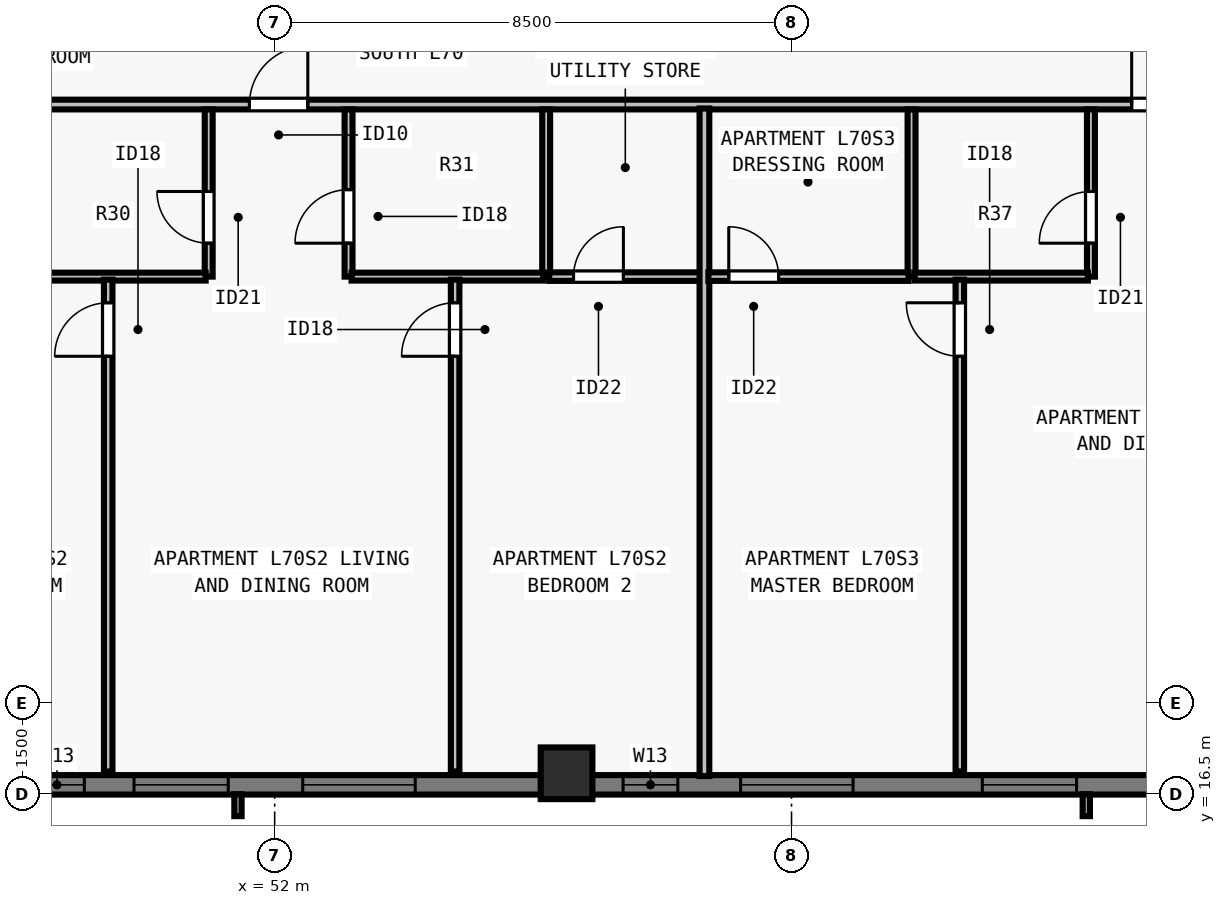
"""IFC4 building model, lengths in metres.
Left out: names, types, materials, properties, quantities, classifications, styles, units other than length and angle.
Written with IfcOpenShell. Run it as: python <this file> out.ifc"""

import sys

from ifc_helpers import new_model, si_unit, direction, frame, frame_2d, origin, origin_2d, place, context, subcontext, project, spatial, rectangle, extrude, element, fill, save


model = new_model("IFC4")
c1 = context("Model", 3, precision=1e-05, world=origin(), true_north=direction((0.0, 1.0)))
c2 = subcontext(c1, "Body", "Model", "MODEL_VIEW")
j1 = project(units=[si_unit("LENGTHUNIT", "METRE"), si_unit("PLANEANGLEUNIT", "RADIAN")], contexts=[c1])
p1 = place(None, origin())
s1 = spatial("IfcSite", under=j1, at=p1, CompositionType="ELEMENT")
p2 = place(p1, origin())
s2 = spatial("IfcBuilding", under=s1, at=p2, CompositionType="ELEMENT")
p3 = place(p2, frame((0.0, 0.0, 255.0)))
s3 = spatial("IfcBuildingStorey", under=s2, at=p3, CompositionType="ELEMENT", Elevation=255.0)
p4 = place(p3, frame((56.8, 16.85, 0.0), z_axis=(0.0, 0.0, 1.0), x_axis=(1.0, 0.0, 0.0)))
e1 = element("IfcColumn", 1, at=p4, inside=s3, PredefinedType="COLUMN", context=c2, shape_type="SweptSolid", body=[
    extrude(rectangle(XDim=0.85, YDim=0.85, at=origin_2d()), origin(), (0.0, 0.0, 1.0), 3.5),
])
p5 = place(p3, frame((69.5, 16.66, 0.0), z_axis=(0.0, 0.0, 1.0), x_axis=(-1.0, 0.0, 0.0)))
e2 = element("IfcWall", 2, at=p5, inside=s3, PredefinedType="SOLIDWALL", context=c2, shape_type="SweptSolid", body=[
    extrude(rectangle(XDim=34.702, YDim=0.32, at=frame_2d((17.351, 0.0))), origin(), (0.0, 0.0, 1.0), 3.29),
])
p6 = place(p5, frame((4.312, 0.0, 0.8)))
e3 = element("IfcOpeningElement", 3, at=p6, cuts=e2, PredefinedType="OPENING", context=c2, shape_type="SweptSolid", body=[
    extrude(rectangle(XDim=1.55, YDim=1.678, at=frame_2d((0.775, 0.839))), frame((0.0, 0.17, 0.0), z_axis=(0.0, -1.0, 0.0), x_axis=(1.0, 0.0, 0.0)), (0.0, 0.0, 1.0), 0.34),
])
p7 = place(p5, frame((7.988, 0.0, 0.8)))
e4 = element("IfcOpeningElement", 4, at=p7, cuts=e2, PredefinedType="OPENING", context=c2, shape_type="SweptSolid", body=[
    extrude(rectangle(XDim=1.85, YDim=1.678, at=frame_2d((0.925, 0.839))), frame((0.0, 0.17, 0.0), z_axis=(0.0, -1.0, 0.0), x_axis=(1.0, 0.0, 0.0)), (0.0, 0.0, 1.0), 0.34),
])
p8 = place(p5, frame((15.188, 0.0, 0.8)))
e5 = element("IfcOpeningElement", 5, at=p8, cuts=e2, PredefinedType="OPENING", context=c2, shape_type="SweptSolid", body=[
    extrude(rectangle(XDim=1.85, YDim=1.678, at=frame_2d((0.925, 0.839))), frame((0.0, 0.17, 0.0), z_axis=(0.0, -1.0, 0.0), x_axis=(1.0, 0.0, 0.0)), (0.0, 0.0, 1.0), 0.34),
])
p9 = place(p5, frame((18.264, 0.0, 0.8)))
e6 = element("IfcOpeningElement", 6, at=p9, cuts=e2, PredefinedType="OPENING", context=c2, shape_type="SweptSolid", body=[
    extrude(rectangle(XDim=1.55, YDim=1.678, at=frame_2d((0.775, 0.839))), frame((0.0, 0.17, 0.0), z_axis=(0.0, -1.0, 0.0), x_axis=(1.0, 0.0, 0.0)), (0.0, 0.0, 1.0), 0.34),
])
p10 = place(p5, frame((25.014, 0.0, 0.8)))
e7 = element("IfcOpeningElement", 7, at=p10, cuts=e2, PredefinedType="OPENING", context=c2, shape_type="SweptSolid", body=[
    extrude(rectangle(XDim=1.55, YDim=1.678, at=frame_2d((0.775, 0.839))), frame((0.0, 0.17, 0.0), z_axis=(0.0, -1.0, 0.0), x_axis=(1.0, 0.0, 0.0)), (0.0, 0.0, 1.0), 0.34),
])
p11 = place(p5, frame((20.63, 0.0, 0.8)))
e8 = element("IfcOpeningElement", 8, at=p11, cuts=e2, PredefinedType="OPENING", context=c2, shape_type="SweptSolid", body=[
    extrude(rectangle(XDim=0.9, YDim=1.678, at=frame_2d((0.45, 0.839))), frame((0.0, 0.17, 0.0), z_axis=(0.0, -1.0, 0.0), x_axis=(1.0, 0.0, 0.0)), (0.0, 0.0, 1.0), 0.34),
])
p12 = place(p5, frame((10.87, 0.0, 0.8)))
e9 = element("IfcOpeningElement", 9, at=p12, cuts=e2, PredefinedType="OPENING", context=c2, shape_type="SweptSolid", body=[
    extrude(rectangle(XDim=0.9, YDim=1.678, at=frame_2d((0.45, 0.839))), frame((0.0, 0.17, 0.0), z_axis=(0.0, -1.0, 0.0), x_axis=(1.0, 0.0, 0.0)), (0.0, 0.0, 1.0), 0.34),
])
p13 = place(p3, frame((32.06, 27.847, 0.0), z_axis=(0.0, 0.0, 1.0), x_axis=(1.0, 0.0, 0.0)))
e10 = element("IfcWall", 10, at=p13, inside=s3, PredefinedType="PARTITIONING", context=c2, shape_type="SweptSolid", body=[
    extrude(rectangle(XDim=42.135, YDim=0.16, at=frame_2d((21.067, 0.0))), origin(), (0.0, 0.0, 1.0), 2.958),
])
p14 = place(p13, frame((4.951, 0.0, 0.0)))
e11 = element("IfcOpeningElement", 11, at=p14, cuts=e10, PredefinedType="OPENING", context=c2, shape_type="SweptSolid", body=[
    extrude(rectangle(XDim=0.96, YDim=2.18, at=frame_2d((0.48, 1.09))), frame((0.0, 0.09, 0.0), z_axis=(0.0, -1.0, 0.0), x_axis=(1.0, 0.0, 0.0)), (0.0, 0.0, 1.0), 0.18),
])
p15 = place(p13, frame((19.525, 0.0, 0.0)))
e12 = element("IfcOpeningElement", 12, at=p15, cuts=e10, PredefinedType="OPENING", context=c2, shape_type="SweptSolid", body=[
    extrude(rectangle(XDim=0.96, YDim=2.18, at=frame_2d((0.48, 1.09))), frame((0.0, 0.09, 0.0), z_axis=(0.0, -1.0, 0.0), x_axis=(1.0, 0.0, 0.0)), (0.0, 0.0, 1.0), 0.18),
])
p16 = place(p13, frame((34.034, 0.0, 0.0)))
e13 = element("IfcOpeningElement", 13, at=p16, cuts=e10, PredefinedType="OPENING", context=c2, shape_type="SweptSolid", body=[
    extrude(rectangle(XDim=0.96, YDim=2.18, at=frame_2d((0.48, 1.09))), frame((0.0, 0.09, 0.0), z_axis=(0.0, -1.0, 0.0), x_axis=(1.0, 0.0, 0.0)), (0.0, 0.0, 1.0), 0.18),
])
p17 = place(p3, frame((50.915, 25.018, 0.0), z_axis=(0.0, 0.0, 1.0), x_axis=(0.0, 1.0, 0.0)))
e14 = element("IfcWall", 14, at=p17, inside=s3, PredefinedType="PLUMBINGWALL", context=c2, shape_type="SweptSolid", body=[
    extrude(rectangle(XDim=2.75, YDim=0.13, at=frame_2d((1.375, 0.0))), origin(), (0.0, 0.0, 1.0), 3.29),
])
p18 = place(p17, frame((0.55, 0.0, 0.0)))
e15 = element("IfcOpeningElement", 15, at=p18, cuts=e14, PredefinedType="OPENING", context=c2, shape_type="SweptSolid", body=[
    extrude(rectangle(XDim=0.85, YDim=2.08, at=frame_2d((0.425, 1.04))), frame((0.0, 0.075, 0.0), z_axis=(0.0, -1.0, 0.0), x_axis=(1.0, 0.0, 0.0)), (0.0, 0.0, 1.0), 0.15),
])
p19 = place(p3, frame((48.015, 25.018, 0.0), z_axis=(0.0, 0.0, 1.0), x_axis=(1.0, 0.0, 0.0)))
e16 = element("IfcWall", 16, at=p19, inside=s3, PredefinedType="PLUMBINGWALL", context=c2, shape_type="SweptSolid", body=[
    extrude(rectangle(XDim=2.85, YDim=0.13, at=frame_2d((1.425, 0.0))), origin(), (0.0, 0.0, 1.0), 3.29),
])
p20 = place(p3, frame((56.465, 25.018, 0.0), z_axis=(0.0, 0.0, 1.0), x_axis=(0.0, 1.0, 0.0)))
e17 = element("IfcWall", 17, at=p20, inside=s3, PredefinedType="PLUMBINGWALL", context=c2, shape_type="SweptSolid", body=[
    extrude(rectangle(XDim=2.75, YDim=0.13, at=frame_2d((1.375, 0.0))), origin(), (0.0, 0.0, 1.0), 3.29),
])
p21 = place(p3, frame((53.215, 25.018, 0.0), z_axis=(0.0, 0.0, 1.0), x_axis=(0.0, 1.0, 0.0)))
e18 = element("IfcWall", 18, at=p21, inside=s3, PredefinedType="PLUMBINGWALL", context=c2, shape_type="SweptSolid", body=[
    extrude(rectangle(XDim=2.75, YDim=0.13, at=frame_2d((1.375, 0.0))), origin(), (0.0, 0.0, 1.0), 2.958),
])
p22 = place(p21, frame((0.55, 0.0, 0.0)))
e19 = element("IfcOpeningElement", 19, at=p22, cuts=e18, PredefinedType="OPENING", context=c2, shape_type="SweptSolid", body=[
    extrude(rectangle(XDim=0.88, YDim=2.1, at=frame_2d((0.44, 1.05))), frame((0.0, 0.075, 0.0), z_axis=(0.0, -1.0, 0.0), x_axis=(1.0, 0.0, 0.0)), (0.0, 0.0, 1.0), 0.15),
])
p23 = place(p3, frame((53.265, 25.018, 0.0), z_axis=(0.0, 0.0, 1.0), x_axis=(1.0, 0.0, 0.0)))
e20 = element("IfcWall", 20, at=p23, inside=s3, PredefinedType="PLUMBINGWALL", context=c2, shape_type="SweptSolid", body=[
    extrude(rectangle(XDim=3.15, YDim=0.13, at=frame_2d((1.575, 0.0))), origin(), (0.0, 0.0, 1.0), 3.29),
])
p24 = place(p3, frame((49.262, 16.88, 0.0), z_axis=(0.0, 0.0, 1.0), x_axis=(0.0, 1.0, 0.0)))
e21 = element("IfcWall", 21, at=p24, inside=s3, PredefinedType="PARTITIONING", context=c2, shape_type="SweptSolid", body=[
    extrude(rectangle(XDim=8.088, YDim=0.14, at=frame_2d((4.044, 0.0))), origin(), (0.0, 0.0, 1.0), 2.958),
])
p25 = place(p24, frame((6.827, 0.0, 0.0)))
e22 = element("IfcOpeningElement", 22, at=p25, cuts=e21, PredefinedType="OPENING", context=c2, shape_type="SweptSolid", body=[
    extrude(rectangle(XDim=0.88, YDim=2.1, at=frame_2d((0.44, 1.05))), frame((0.0, 0.08, 0.0), z_axis=(0.0, -1.0, 0.0), x_axis=(1.0, 0.0, 0.0)), (0.0, 0.0, 1.0), 0.16),
])
p26 = place(p3, frame((54.968, 16.88, 0.0), z_axis=(0.0, 0.0, 1.0), x_axis=(0.0, 1.0, 0.0)))
e23 = element("IfcWall", 23, at=p26, inside=s3, PredefinedType="PARTITIONING", context=c2, shape_type="SweptSolid", body=[
    extrude(rectangle(XDim=8.088, YDim=0.14, at=frame_2d((4.044, 0.0))), origin(), (0.0, 0.0, 1.0), 3.29),
])
p27 = place(p26, frame((6.827, 0.0, 0.0)))
e24 = element("IfcOpeningElement", 24, at=p27, cuts=e23, PredefinedType="OPENING", context=c2, shape_type="SweptSolid", body=[
    extrude(rectangle(XDim=0.88, YDim=2.1, at=frame_2d((0.44, 1.05))), frame((0.0, 0.08, 0.0), z_axis=(0.0, -1.0, 0.0), x_axis=(1.0, 0.0, 0.0)), (0.0, 0.0, 1.0), 0.16),
])
p28 = place(p3, frame((56.515, 25.018, 0.0), z_axis=(0.0, 0.0, 1.0), x_axis=(1.0, 0.0, 0.0)))
e25 = element("IfcWall", 25, at=p28, inside=s3, PredefinedType="PARTITIONING", context=c2, shape_type="SweptSolid", body=[
    extrude(rectangle(XDim=2.603, YDim=0.14, at=frame_2d((1.301, 0.0))), origin(), (0.0, 0.0, 1.0), 3.29),
])
p29 = place(p28, frame((0.4, 0.0, 0.0)))
e26 = element("IfcOpeningElement", 26, at=p29, cuts=e25, PredefinedType="OPENING", context=c2, shape_type="SweptSolid", body=[
    extrude(rectangle(XDim=0.82, YDim=2.1, at=frame_2d((0.41, 1.05))), frame((0.0, 0.08, 0.0), z_axis=(0.0, -1.0, 0.0), x_axis=(1.0, 0.0, 0.0)), (0.0, 0.0, 1.0), 0.16),
])
p30 = place(p3, frame((59.067, 16.805, 0.0), z_axis=(0.0, 0.0, 1.0), x_axis=(0.0, 1.0, 0.0)))
e27 = element("IfcWall", 27, at=p30, inside=s3, PredefinedType="PARTITIONING", context=c2, shape_type="SweptSolid", body=[
    extrude(rectangle(XDim=10.978, YDim=0.16, at=frame_2d((5.489, 0.0))), origin(), (0.0, 0.0, 1.0), 3.29),
])
p31 = place(p3, frame((62.474, 25.018, 0.0), z_axis=(0.0, 0.0, 1.0), x_axis=(0.0, 1.0, 0.0)))
e28 = element("IfcWall", 28, at=p31, inside=s3, PredefinedType="PLUMBINGWALL", context=c2, shape_type="SweptSolid", body=[
    extrude(rectangle(XDim=2.75, YDim=0.13, at=frame_2d((1.375, 0.0))), origin(), (0.0, 0.0, 1.0), 2.573),
])
p32 = place(p3, frame((65.424, 25.018, 0.0), z_axis=(0.0, 0.0, 1.0), x_axis=(0.0, 1.0, 0.0)))
e29 = element("IfcWall", 29, at=p32, inside=s3, PredefinedType="PLUMBINGWALL", context=c2, shape_type="SweptSolid", body=[
    extrude(rectangle(XDim=2.75, YDim=0.13, at=frame_2d((1.375, 0.0))), origin(), (0.0, 0.0, 1.0), 3.29),
])
p33 = place(p32, frame((0.55, 0.0, 0.0)))
e30 = element("IfcOpeningElement", 30, at=p33, cuts=e29, PredefinedType="OPENING", context=c2, shape_type="SweptSolid", body=[
    extrude(rectangle(XDim=0.85, YDim=2.08, at=frame_2d((0.425, 1.04))), frame((0.0, 0.075, 0.0), z_axis=(0.0, -1.0, 0.0), x_axis=(1.0, 0.0, 0.0)), (0.0, 0.0, 1.0), 0.15),
])
p34 = place(p3, frame((62.524, 25.018, 0.0), z_axis=(0.0, 0.0, 1.0), x_axis=(1.0, 0.0, 0.0)))
e31 = element("IfcWall", 31, at=p34, inside=s3, PredefinedType="PLUMBINGWALL", context=c2, shape_type="SweptSolid", body=[
    extrude(rectangle(XDim=2.85, YDim=0.13, at=frame_2d((1.425, 0.0))), origin(), (0.0, 0.0, 1.0), 3.29),
])
p35 = place(p3, frame((63.268, 16.88, 0.0), z_axis=(0.0, 0.0, 1.0), x_axis=(0.0, 1.0, 0.0)))
e32 = element("IfcWall", 32, at=p35, inside=s3, PredefinedType="PARTITIONING", context=c2, shape_type="SweptSolid", body=[
    extrude(rectangle(XDim=8.088, YDim=0.14, at=frame_2d((4.044, 0.0))), origin(), (0.0, 0.0, 1.0), 3.29),
])
p36 = place(p35, frame((6.827, 0.0, 0.0)))
e33 = element("IfcOpeningElement", 33, at=p36, cuts=e32, PredefinedType="OPENING", context=c2, shape_type="SweptSolid", body=[
    extrude(rectangle(XDim=0.88, YDim=2.1, at=frame_2d((0.44, 1.05))), frame((0.0, 0.08, 0.0), z_axis=(0.0, -1.0, 0.0), x_axis=(1.0, 0.0, 0.0)), (0.0, 0.0, 1.0), 0.16),
])
p37 = place(p3, frame((59.133, 25.018, 0.0), z_axis=(0.0, 0.0, 1.0), x_axis=(1.0, 0.0, 0.0)))
e34 = element("IfcWall", 34, at=p37, inside=s3, PredefinedType="PARTITIONING", context=c2, shape_type="SweptSolid", body=[
    extrude(rectangle(XDim=3.291, YDim=0.14, at=frame_2d((1.646, 0.0))), origin(), (0.0, 0.0, 1.0), 3.29),
])
p38 = place(p37, frame((0.335, 0.0, 0.0)))
e35 = element("IfcOpeningElement", 35, at=p38, cuts=e34, PredefinedType="OPENING", context=c2, shape_type="SweptSolid", body=[
    extrude(rectangle(XDim=0.82, YDim=2.1, at=frame_2d((0.41, 1.05))), frame((0.0, 0.08, 0.0), z_axis=(0.0, -1.0, 0.0), x_axis=(1.0, 0.0, 0.0)), (0.0, 0.0, 1.0), 0.16),
])
p39 = place(p6, origin())
e36 = element("IfcWindow", 36, at=p39, inside=s3, PartitioningType="SINGLE_PANEL", PredefinedType="WINDOW", context=c2, shape_type="SweptSolid", body=[
    extrude(rectangle(XDim=1.55, YDim=1.678, at=frame_2d((0.775, 0.839))), frame((0.0, -0.05, 0.0), z_axis=(0.0, -1.0, 0.0), x_axis=(1.0, 0.0, 0.0)), (0.0, 0.0, 1.0), 0.06),
])
fill(e3, e36)
p40 = place(p7, origin())
e37 = element("IfcWindow", 37, at=p40, inside=s3, PartitioningType="SINGLE_PANEL", PredefinedType="WINDOW", context=c2, shape_type="SweptSolid", body=[
    extrude(rectangle(XDim=1.85, YDim=1.678, at=frame_2d((0.925, 0.839))), frame((0.0, -0.05, 0.0), z_axis=(0.0, -1.0, 0.0), x_axis=(1.0, 0.0, 0.0)), (0.0, 0.0, 1.0), 0.06),
])
fill(e4, e37)
p41 = place(p8, origin())
e38 = element("IfcWindow", 38, at=p41, inside=s3, PartitioningType="SINGLE_PANEL", PredefinedType="WINDOW", context=c2, shape_type="SweptSolid", body=[
    extrude(rectangle(XDim=1.85, YDim=1.678, at=frame_2d((0.925, 0.839))), frame((0.0, -0.05, 0.0), z_axis=(0.0, -1.0, 0.0), x_axis=(1.0, 0.0, 0.0)), (0.0, 0.0, 1.0), 0.06),
])
fill(e5, e38)
p42 = place(p9, origin())
e39 = element("IfcWindow", 39, at=p42, inside=s3, PartitioningType="SINGLE_PANEL", PredefinedType="WINDOW", context=c2, shape_type="SweptSolid", body=[
    extrude(rectangle(XDim=1.55, YDim=1.678, at=frame_2d((0.775, 0.839))), frame((0.0, -0.05, 0.0), z_axis=(0.0, -1.0, 0.0), x_axis=(1.0, 0.0, 0.0)), (0.0, 0.0, 1.0), 0.06),
])
fill(e6, e39)
p43 = place(p11, origin())
e40 = element("IfcWindow", 40, at=p43, inside=s3, PartitioningType="SINGLE_PANEL", PredefinedType="WINDOW", context=c2, shape_type="SweptSolid", body=[
    extrude(rectangle(XDim=0.9, YDim=1.678, at=frame_2d((0.45, 0.839))), frame((0.0, -0.04, 0.0), z_axis=(0.0, -1.0, 0.0), x_axis=(1.0, 0.0, 0.0)), (0.0, 0.0, 1.0), 0.06),
])
fill(e8, e40)
p44 = place(p12, origin())
e41 = element("IfcWindow", 41, at=p44, inside=s3, PartitioningType="SINGLE_PANEL", PredefinedType="WINDOW", context=c2, shape_type="SweptSolid", body=[
    extrude(rectangle(XDim=0.9, YDim=1.678, at=frame_2d((0.45, 0.839))), frame((0.0, -0.04, 0.0), z_axis=(0.0, -1.0, 0.0), x_axis=(1.0, 0.0, 0.0)), (0.0, 0.0, 1.0), 0.06),
])
fill(e9, e41)
p45 = place(p18, origin())
e42 = element("IfcDoor", 42, at=p45, inside=s3, OperationType="SINGLE_SWING_RIGHT", PredefinedType="DOOR", context=c2, shape_type="SweptSolid", body=[
    extrude(rectangle(XDim=0.85, YDim=2.08, at=frame_2d((0.425, 1.04))), frame((0.0, 0.025, 0.0), z_axis=(0.0, -1.0, 0.0), x_axis=(1.0, 0.0, 0.0)), (0.0, 0.0, 1.0), 0.05),
])
fill(e15, e42)
p46 = place(p22, origin())
e43 = element("IfcDoor", 43, at=p46, inside=s3, OperationType="SINGLE_SWING_LEFT", PredefinedType="DOOR", context=c2, shape_type="SweptSolid", body=[
    extrude(rectangle(XDim=0.88, YDim=2.1, at=frame_2d((0.44, 1.05))), frame((0.0, 0.025, 0.0), z_axis=(0.0, -1.0, 0.0), x_axis=(1.0, 0.0, 0.0)), (0.0, 0.0, 1.0), 0.05),
])
fill(e19, e43)
p47 = place(p25, origin())
e44 = element("IfcDoor", 44, at=p47, inside=s3, OperationType="SINGLE_SWING_LEFT", PredefinedType="DOOR", context=c2, shape_type="SweptSolid", body=[
    extrude(rectangle(XDim=0.88, YDim=2.1, at=frame_2d((0.44, 1.05))), frame((0.0, 0.025, 0.0), z_axis=(0.0, -1.0, 0.0), x_axis=(1.0, 0.0, 0.0)), (0.0, 0.0, 1.0), 0.05),
])
fill(e22, e44)
p48 = place(p29, origin())
e45 = element("IfcDoor", 45, at=p48, inside=s3, OperationType="SINGLE_SWING_RIGHT", PredefinedType="DOOR", context=c2, shape_type="SweptSolid", body=[
    extrude(rectangle(XDim=0.82, YDim=2.1, at=frame_2d((0.41, 1.05))), frame((0.0, 0.025, 0.0), z_axis=(0.0, -1.0, 0.0), x_axis=(1.0, 0.0, 0.0)), (0.0, 0.0, 1.0), 0.05),
])
fill(e26, e45)
p49 = place(p27, origin())
e46 = element("IfcDoor", 46, at=p49, inside=s3, OperationType="SINGLE_SWING_LEFT", PredefinedType="DOOR", context=c2, shape_type="SweptSolid", body=[
    extrude(rectangle(XDim=0.88, YDim=2.1, at=frame_2d((0.44, 1.05))), frame((0.0, 0.025, 0.0), z_axis=(0.0, -1.0, 0.0), x_axis=(1.0, 0.0, 0.0)), (0.0, 0.0, 1.0), 0.05),
])
fill(e24, e46)
p50 = place(p15, origin())
e47 = element("IfcDoor", 47, at=p50, inside=s3, OperationType="SINGLE_SWING_RIGHT", PredefinedType="DOOR", context=c2, shape_type="SweptSolid", body=[
    extrude(rectangle(XDim=0.96, YDim=2.18, at=frame_2d((0.48, 1.09))), frame((0.0, 0.025, 0.0), z_axis=(0.0, -1.0, 0.0), x_axis=(1.0, 0.0, 0.0)), (0.0, 0.0, 1.0), 0.05),
])
fill(e12, e47)
p51 = place(p33, origin())
e48 = element("IfcDoor", 48, at=p51, inside=s3, OperationType="SINGLE_SWING_LEFT", PredefinedType="DOOR", context=c2, shape_type="SweptSolid", body=[
    extrude(rectangle(XDim=0.85, YDim=2.08, at=frame_2d((0.425, 1.04))), frame((0.0, 0.025, 0.0), z_axis=(0.0, -1.0, 0.0), x_axis=(1.0, 0.0, 0.0)), (0.0, 0.0, 1.0), 0.05),
])
fill(e30, e48)
p52 = place(p38, origin())
e49 = element("IfcDoor", 49, at=p52, inside=s3, OperationType="SINGLE_SWING_LEFT", PredefinedType="DOOR", context=c2, shape_type="SweptSolid", body=[
    extrude(rectangle(XDim=0.82, YDim=2.1, at=frame_2d((0.41, 1.05))), frame((0.0, 0.025, 0.0), z_axis=(0.0, -1.0, 0.0), x_axis=(1.0, 0.0, 0.0)), (0.0, 0.0, 1.0), 0.05),
])
fill(e35, e49)
p53 = place(p36, origin())
e50 = element("IfcDoor", 50, at=p53, inside=s3, OperationType="SINGLE_SWING_RIGHT", PredefinedType="DOOR", context=c2, shape_type="SweptSolid", body=[
    extrude(rectangle(XDim=0.88, YDim=2.1, at=frame_2d((0.44, 1.05))), frame((0.0, 0.025, 0.0), z_axis=(0.0, -1.0, 0.0), x_axis=(1.0, 0.0, 0.0)), (0.0, 0.0, 1.0), 0.05),
])
fill(e33, e50)
p54 = place(p16, origin())
e51 = element("IfcDoor", 51, at=p54, inside=s3, OperationType="SINGLE_SWING_LEFT", PredefinedType="DOOR", context=c2, shape_type="SweptSolid", body=[
    extrude(rectangle(XDim=0.96, YDim=2.18, at=frame_2d((0.48, 1.09))), frame((0.0, 0.025, 0.0), z_axis=(0.0, -1.0, 0.0), x_axis=(1.0, 0.0, 0.0)), (0.0, 0.0, 1.0), 0.05),
])
fill(e13, e51)
save(model, sys.argv[1])
